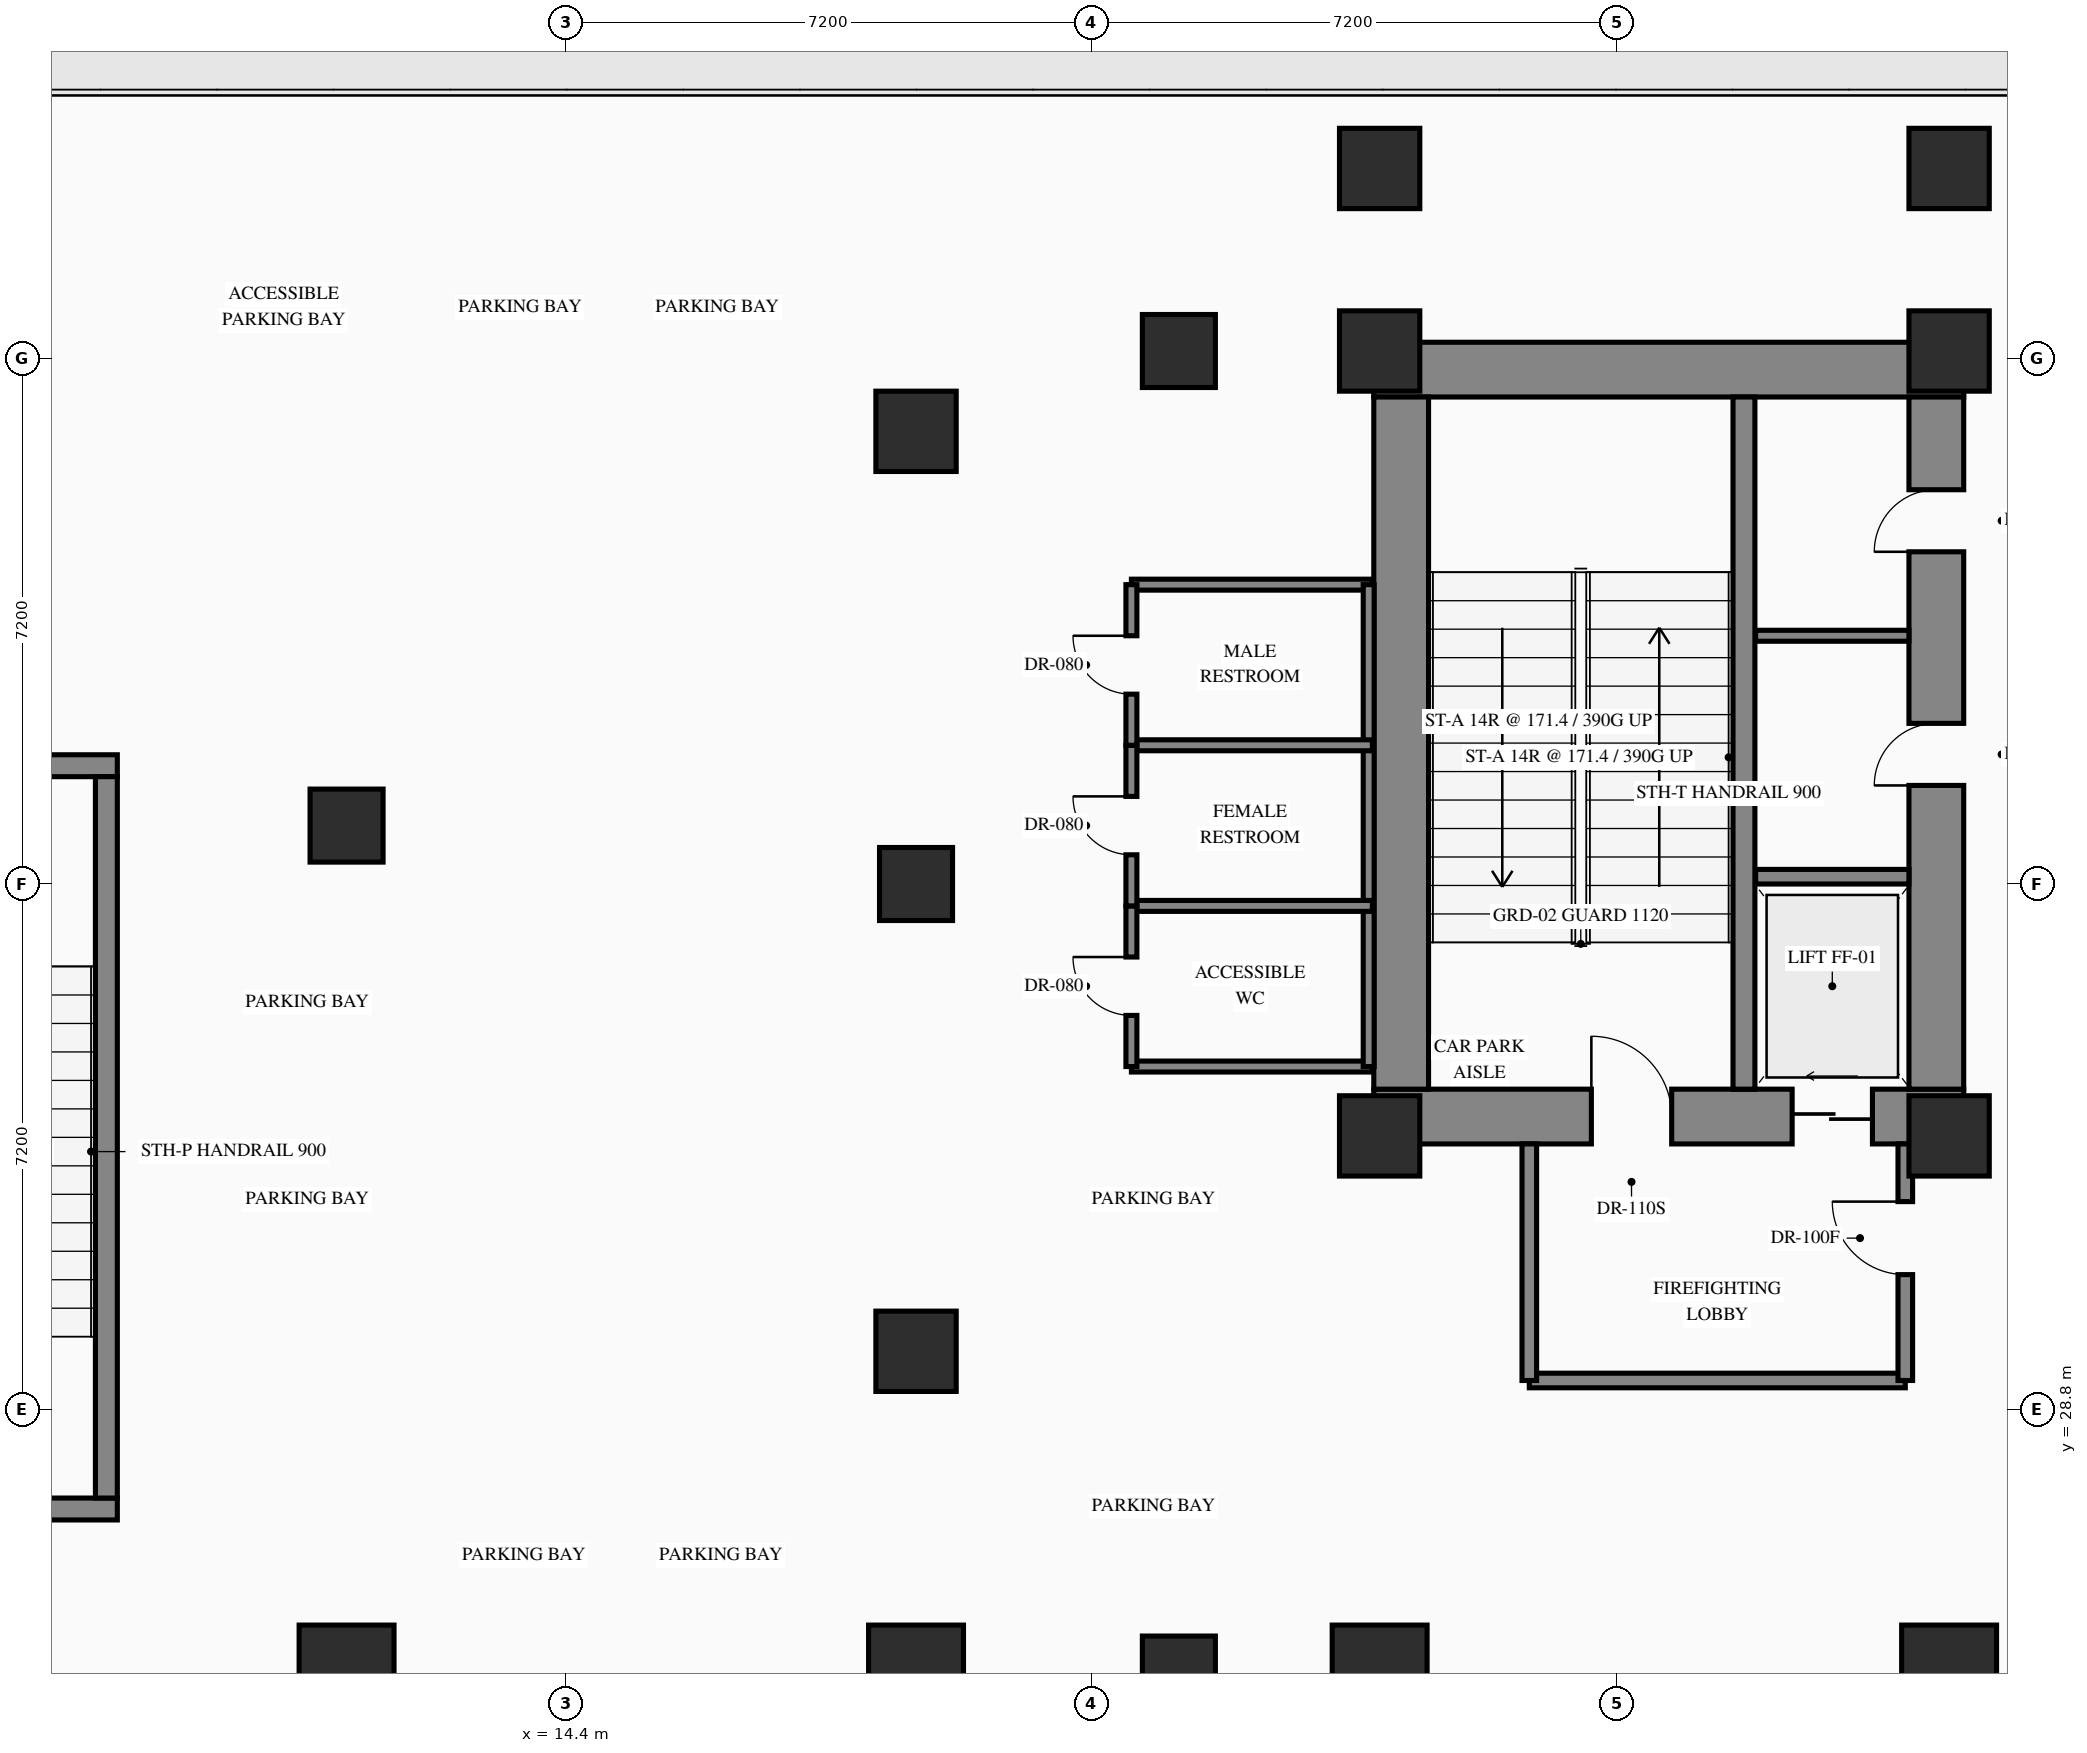
"""IFC4 building model, lengths in metres.
Left out: names, types, materials, properties, quantities, classifications, styles, units other than length and angle.
Written with IfcOpenShell. Run it as: python <this file> out.ifc"""

import sys

from ifc_helpers import new_model, si_unit, direction, frame, frame_2d, origin, origin_2d, place, context, subcontext, project, spatial, rectangle, hollow_rectangle, extrude, element, fill, save


model = new_model("IFC4")
c1 = context("Model", 3, precision=1e-05, world=origin(), true_north=direction((0.0, 1.0)))
c2 = subcontext(c1, "Body", "Model", "MODEL_VIEW")
j1 = project(units=[si_unit("LENGTHUNIT", "METRE"), si_unit("PLANEANGLEUNIT", "RADIAN")], contexts=[c1])
p1 = place(None, origin())
s1 = spatial("IfcSite", under=j1, at=p1, CompositionType="ELEMENT")
p2 = place(p1, origin())
s2 = spatial("IfcBuilding", under=s1, at=p2, CompositionType="ELEMENT")
p3 = place(p2, frame((0.0, 0.0, -9.6)))
s3 = spatial("IfcBuildingStorey", under=s2, at=p3, CompositionType="ELEMENT", Elevation=-9.6)
p4 = place(p3, frame((25.47, 32.815, 0.0), z_axis=(0.0, 0.0, 1.0), x_axis=(1.0, 0.0, 0.0)))
e1 = element("IfcWall", 1, at=p4, inside=s3, PredefinedType="SHEAR", context=c2, shape_type="SweptSolid", body=[
    extrude(rectangle(XDim=8.08, YDim=0.75, at=frame_2d((4.04, 0.0))), origin(), (0.0, 0.0, 1.0), 4.8),
])
p5 = place(p4, frame((2.98, 0.0, 0.0)))
e2 = element("IfcOpeningElement", 2, at=p5, cuts=e1, PredefinedType="OPENING", context=c2, shape_type="SweptSolid", body=[
    extrude(rectangle(XDim=1.1, YDim=2.2, at=frame_2d((0.55, 1.1))), frame((0.0, 0.385, 0.0), z_axis=(0.0, -1.0, 0.0), x_axis=(1.0, 0.0, 0.0)), (0.0, 0.0, 1.0), 0.77),
])
p6 = place(p4, frame((5.73, 0.0, 0.0)))
e3 = element("IfcOpeningElement", 3, at=p6, cuts=e1, PredefinedType="OPENING", context=c2, shape_type="SweptSolid", body=[
    extrude(rectangle(XDim=1.1, YDim=2.15, at=frame_2d((0.55, 1.075))), frame((0.0, 0.385, 0.0), z_axis=(0.0, -1.0, 0.0), x_axis=(1.0, 0.0, 0.0)), (0.0, 0.0, 1.0), 0.77),
])
p7 = place(p3, frame((25.47, 43.045, 0.0), z_axis=(0.0, 0.0, 1.0), x_axis=(1.0, 0.0, 0.0)))
e4 = element("IfcWall", 4, at=p7, inside=s3, PredefinedType="SHEAR", context=c2, shape_type="SweptSolid", body=[
    extrude(rectangle(XDim=8.08, YDim=0.75, at=frame_2d((4.04, 0.0))), origin(), (0.0, 0.0, 1.0), 4.8),
])
p8 = place(p3, frame((25.845, 33.19, 0.0), z_axis=(0.0, 0.0, 1.0), x_axis=(0.0, 1.0, 0.0)))
e5 = element("IfcWall", 5, at=p8, inside=s3, PredefinedType="SHEAR", context=c2, shape_type="SweptSolid", body=[
    extrude(rectangle(XDim=9.48, YDim=0.75, at=frame_2d((4.74, 0.0))), origin(), (0.0, 0.0, 1.0), 4.8),
])
p9 = place(p3, frame((33.175, 33.19, 0.0), z_axis=(0.0, 0.0, 1.0), x_axis=(0.0, 1.0, 0.0)))
e6 = element("IfcWall", 6, at=p9, inside=s3, PredefinedType="SHEAR", context=c2, shape_type="SweptSolid", body=[
    extrude(rectangle(XDim=9.48, YDim=0.75, at=frame_2d((4.74, 0.0))), origin(), (0.0, 0.0, 1.0), 4.8),
])
p10 = place(p9, frame((4.16, 0.0, 0.0)))
e7 = element("IfcOpeningElement", 7, at=p10, cuts=e6, PredefinedType="OPENING", context=c2, shape_type="SweptSolid", body=[
    extrude(rectangle(XDim=0.85, YDim=2.08, at=frame_2d((0.425, 1.04))), frame((0.0, 0.385, 0.0), z_axis=(0.0, -1.0, 0.0), x_axis=(1.0, 0.0, 0.0)), (0.0, 0.0, 1.0), 0.77),
])
p11 = place(p9, frame((7.36, 0.0, 0.0)))
e8 = element("IfcOpeningElement", 8, at=p11, cuts=e6, PredefinedType="OPENING", context=c2, shape_type="SweptSolid", body=[
    extrude(rectangle(XDim=0.85, YDim=2.08, at=frame_2d((0.425, 1.04))), frame((0.0, 0.385, 0.0), z_axis=(0.0, -1.0, 0.0), x_axis=(1.0, 0.0, 0.0)), (0.0, 0.0, 1.0), 0.77),
])
p12 = place(p3, frame((30.54, 33.19, 0.0), z_axis=(0.0, 0.0, 1.0), x_axis=(0.0, 1.0, 0.0)))
e9 = element("IfcWall", 9, at=p12, inside=s3, PredefinedType="SHEAR", context=c2, shape_type="SweptSolid", body=[
    extrude(rectangle(XDim=9.48, YDim=0.3, at=frame_2d((4.74, 0.0))), origin(), (0.0, 0.0, 1.0), 4.8),
])
p13 = place(p3, frame((3.09, 27.44, 0.0), z_axis=(0.0, 0.0, 1.0), x_axis=(1.0, 0.0, 0.0)))
e10 = element("IfcWall", 10, at=p13, inside=s3, PredefinedType="SHEAR", context=c2, shape_type="SweptSolid", body=[
    extrude(rectangle(XDim=5.17, YDim=0.3, at=frame_2d((2.585, 0.0))), origin(), (0.0, 0.0, 1.0), 4.8),
])
p14 = place(p13, frame((2.06, 0.0, 0.0)))
e11 = element("IfcOpeningElement", 11, at=p14, cuts=e10, PredefinedType="OPENING", context=c2, shape_type="SweptSolid", body=[
    extrude(rectangle(XDim=1.1, YDim=2.2, at=frame_2d((0.55, 1.1))), frame((0.0, 0.16, 0.0), z_axis=(0.0, -1.0, 0.0), x_axis=(1.0, 0.0, 0.0)), (0.0, 0.0, 1.0), 0.32),
])
p15 = place(p3, frame((3.09, 37.62, 0.0), z_axis=(0.0, 0.0, 1.0), x_axis=(1.0, 0.0, 0.0)))
e12 = element("IfcWall", 12, at=p15, inside=s3, PredefinedType="SHEAR", context=c2, shape_type="SweptSolid", body=[
    extrude(rectangle(XDim=5.17, YDim=0.3, at=frame_2d((2.585, 0.0))), origin(), (0.0, 0.0, 1.0), 4.8),
])
p16 = place(p3, frame((8.11, 27.59, 0.0), z_axis=(0.0, 0.0, 1.0), x_axis=(0.0, 1.0, 0.0)))
e13 = element("IfcWall", 13, at=p16, inside=s3, PredefinedType="SHEAR", context=c2, shape_type="SweptSolid", body=[
    extrude(rectangle(XDim=9.88, YDim=0.3, at=frame_2d((4.94, 0.0))), origin(), (0.0, 0.0, 1.0), 4.8),
])
for number, where, z_axis, x_axis in (
    (14, (25.55, 32.55, 0.0), (0.0, 0.0, 1.0), (1.0, 0.0, 0.0)),
    (15, (33.35, 32.55, 0.0), (0.0, 0.0, 1.0), (1.0, 0.0, 0.0)),
    (16, (25.55, 43.3, 0.0), (0.0, 0.0, 1.0), (1.0, 0.0, 0.0)),
    (17, (33.35, 43.3, 0.0), (0.0, 0.0, 1.0), (1.0, 0.0, 0.0)),
):
    element("IfcColumn", number, at=place(p3, frame(where, z_axis=z_axis, x_axis=x_axis)), inside=s3, PredefinedType="COLUMN", context=c2, shape_type="SweptSolid", body=[
        extrude(rectangle(XDim=1.1, YDim=1.1, at=origin_2d()), origin(), (0.0, 0.0, 1.0), 4.8),
    ])
for number, where, z_axis, x_axis in (
    (18, (25.55, 25.2, 0.0), (0.0, 0.0, 1.0), (1.0, 0.0, 0.0)),
    (19, (33.35, 25.2, 0.0), (0.0, 0.0, 1.0), (1.0, 0.0, 0.0)),
):
    element("IfcColumn", number, at=place(p3, frame(where, z_axis=z_axis, x_axis=x_axis)), inside=s3, PredefinedType="COLUMN", context=c2, shape_type="SweptSolid", body=[
        extrude(rectangle(XDim=1.3, YDim=1.3, at=origin_2d()), origin(), (0.0, 0.0, 1.0), 4.8),
    ])
for number, where, z_axis, x_axis in (
    (20, (25.55, 45.8, 0.0), (0.0, 0.0, 1.0), (1.0, 0.0, 0.0)),
    (21, (33.35, 45.8, 0.0), (0.0, 0.0, 1.0), (1.0, 0.0, 0.0)),
):
    element("IfcColumn", number, at=place(p3, frame(where, z_axis=z_axis, x_axis=x_axis)), inside=s3, PredefinedType="COLUMN", context=c2, shape_type="SweptSolid", body=[
        extrude(hollow_rectangle(XDim=1.1, YDim=1.1, WallThickness=0.04, at=origin_2d()), origin(), (0.0, 0.0, 1.0), 4.8),
    ])
for number, where, z_axis, x_axis in (
    (22, (11.4, 25.2, 0.0), (0.0, 0.0, 1.0), (1.0, 0.0, 0.0)),
    (23, (19.2, 25.2, 0.0), (0.0, 0.0, 1.0), (1.0, 0.0, 0.0)),
):
    element("IfcColumn", number, at=place(p3, frame(where, z_axis=z_axis, x_axis=x_axis)), inside=s3, PredefinedType="COLUMN", context=c2, shape_type="SweptSolid", body=[
        extrude(rectangle(XDim=1.3, YDim=1.3, at=origin_2d()), origin(), (0.0, 0.0, 1.0), 4.8),
    ])
for number, where, z_axis, x_axis in (
    (24, (19.2, 29.6, 0.0), (0.0, 0.0, 1.0), (1.0, 0.0, 0.0)),
    (25, (19.2, 42.2, 0.0), (0.0, 0.0, 1.0), (1.0, 0.0, 0.0)),
):
    element("IfcColumn", number, at=place(p3, frame(where, z_axis=z_axis, x_axis=x_axis)), inside=s3, PredefinedType="COLUMN", context=c2, shape_type="SweptSolid", body=[
        extrude(hollow_rectangle(XDim=1.1, YDim=1.1, WallThickness=0.04, at=origin_2d()), origin(), (0.0, 0.0, 1.0), 4.8),
    ])
for number, where, z_axis, x_axis in (
    (26, (22.8, 25.2, 0.0), (0.0, 0.0, 1.0), (1.0, 0.0, 0.0)),
    (27, (22.8, 43.3, 0.0), (0.0, 0.0, 1.0), (1.0, 0.0, 0.0)),
    (28, (11.4, 36.8, 0.0), (0.0, 0.0, 1.0), (1.0, 0.0, 0.0)),
    (29, (19.2, 36.0, 0.0), (0.0, 0.0, 1.0), (1.0, 0.0, 0.0)),
):
    element("IfcColumn", number, at=place(p3, frame(where, z_axis=z_axis, x_axis=x_axis)), inside=s3, PredefinedType="COLUMN", context=c2, shape_type="SweptSolid", body=[
        extrude(hollow_rectangle(XDim=1.0, YDim=1.0, WallThickness=0.038, at=origin_2d()), origin(), (0.0, 0.0, 1.0), 4.8),
    ])
p17 = place(p3, frame((30.7, 36.1, 0.0), z_axis=(0.0, 0.0, 1.0), x_axis=(1.0, 0.0, 0.0)))
e30 = element("IfcWall", 30, at=p17, inside=s3, PredefinedType="STANDARD", context=c2, shape_type="SweptSolid", body=[
    extrude(rectangle(XDim=2.1, YDim=0.2, at=frame_2d((1.05, 0.0))), origin(), (0.0, 0.0, 1.0), 4.5),
])
p18 = place(p3, frame((30.7, 39.4, 0.0), z_axis=(0.0, 0.0, 1.0), x_axis=(1.0, 0.0, 0.0)))
e31 = element("IfcWall", 31, at=p18, inside=s3, PredefinedType="PARTITIONING", context=c2, shape_type="SweptSolid", body=[
    extrude(rectangle(XDim=2.1, YDim=0.15, at=frame_2d((1.05, 0.0))), origin(), (0.0, 0.0, 1.0), 4.5),
])
p19 = place(p3, frame((27.6, 29.2, 0.0), z_axis=(0.0, 0.0, 1.0), x_axis=(1.0, 0.0, 0.0)))
e32 = element("IfcWall", 32, at=p19, inside=s3, PredefinedType="STANDARD", context=c2, shape_type="SweptSolid", body=[
    extrude(rectangle(XDim=5.15, YDim=0.2, at=frame_2d((2.575, 0.0))), origin(), (0.0, 0.0, 1.0), 4.5),
])
p20 = place(p3, frame((27.6, 29.2, 0.0), z_axis=(0.0, 0.0, 1.0), x_axis=(0.0, 1.0, 0.0)))
e33 = element("IfcWall", 33, at=p20, inside=s3, PredefinedType="STANDARD", context=c2, shape_type="SweptSolid", body=[
    extrude(rectangle(XDim=3.24, YDim=0.2, at=frame_2d((1.62, 0.0))), origin(), (0.0, 0.0, 1.0), 4.5),
])
p21 = place(p3, frame((32.75, 29.2, 0.0), z_axis=(0.0, 0.0, 1.0), x_axis=(0.0, 1.0, 0.0)))
e34 = element("IfcWall", 34, at=p21, inside=s3, PredefinedType="STANDARD", context=c2, shape_type="SweptSolid", body=[
    extrude(rectangle(XDim=3.24, YDim=0.2, at=frame_2d((1.62, 0.0))), origin(), (0.0, 0.0, 1.0), 4.5),
])
p22 = place(p21, frame((1.45, 0.0, 0.0)))
e35 = element("IfcOpeningElement", 35, at=p22, cuts=e34, PredefinedType="OPENING", context=c2, shape_type="SweptSolid", body=[
    extrude(rectangle(XDim=1.0, YDim=2.2, at=frame_2d((0.5, 1.1))), frame((0.0, 0.11, 0.0), z_axis=(0.0, -1.0, 0.0), x_axis=(1.0, 0.0, 0.0)), (0.0, 0.0, 1.0), 0.22),
])
for number, where, z_axis, x_axis in (
    (36, (22.15, 33.5, 0.0), (0.0, 0.0, 1.0), (1.0, 0.0, 0.0)),
    (37, (22.15, 40.1, 0.0), (0.0, 0.0, 1.0), (1.0, 0.0, 0.0)),
):
    element("IfcWall", number, at=place(p3, frame(where, z_axis=z_axis, x_axis=x_axis)), inside=s3, PredefinedType="PARTITIONING", context=c2, shape_type="SweptSolid", body=[
        extrude(rectangle(XDim=3.3, YDim=0.15, at=frame_2d((1.65, 0.0))), origin(), (0.0, 0.0, 1.0), 4.5),
    ])
p23 = place(p3, frame((25.4, 33.5, 0.0), z_axis=(0.0, 0.0, 1.0), x_axis=(0.0, 1.0, 0.0)))
e38 = element("IfcWall", 38, at=p23, inside=s3, PredefinedType="PARTITIONING", context=c2, shape_type="SweptSolid", body=[
    extrude(rectangle(XDim=6.6, YDim=0.15, at=frame_2d((3.3, 0.0))), origin(), (0.0, 0.0, 1.0), 4.5),
])
for number, where, z_axis, x_axis in (
    (39, (22.15, 35.7, 0.0), (0.0, 0.0, 1.0), (1.0, 0.0, 0.0)),
    (40, (22.15, 37.9, 0.0), (0.0, 0.0, 1.0), (1.0, 0.0, 0.0)),
):
    element("IfcWall", number, at=place(p3, frame(where, z_axis=z_axis, x_axis=x_axis)), inside=s3, PredefinedType="PARTITIONING", context=c2, shape_type="SweptSolid", body=[
        extrude(rectangle(XDim=3.3, YDim=0.15, at=frame_2d((1.65, 0.0))), origin(), (0.0, 0.0, 1.0), 4.5),
    ])
p24 = place(p3, frame((22.15, 33.5, 0.0), z_axis=(0.0, 0.0, 1.0), x_axis=(0.0, 1.0, 0.0)))
e41 = element("IfcWall", 41, at=p24, inside=s3, PredefinedType="PARTITIONING", context=c2, shape_type="SweptSolid", body=[
    extrude(rectangle(XDim=2.2, YDim=0.15, at=frame_2d((1.1, 0.0))), origin(), (0.0, 0.0, 1.0), 4.5),
])
p25 = place(p24, frame((0.7, 0.0, 0.0)))
e42 = element("IfcOpeningElement", 42, at=p25, cuts=e41, PredefinedType="OPENING", context=c2, shape_type="SweptSolid", body=[
    extrude(rectangle(XDim=0.8, YDim=2.06, at=frame_2d((0.4, 1.03))), frame((0.0, 0.085, 0.0), z_axis=(0.0, -1.0, 0.0), x_axis=(1.0, 0.0, 0.0)), (0.0, 0.0, 1.0), 0.17),
])
p26 = place(p3, frame((22.15, 35.7, 0.0), z_axis=(0.0, 0.0, 1.0), x_axis=(0.0, 1.0, 0.0)))
e43 = element("IfcWall", 43, at=p26, inside=s3, PredefinedType="PARTITIONING", context=c2, shape_type="SweptSolid", body=[
    extrude(rectangle(XDim=2.2, YDim=0.15, at=frame_2d((1.1, 0.0))), origin(), (0.0, 0.0, 1.0), 4.5),
])
p27 = place(p26, frame((0.7, 0.0, 0.0)))
e44 = element("IfcOpeningElement", 44, at=p27, cuts=e43, PredefinedType="OPENING", context=c2, shape_type="SweptSolid", body=[
    extrude(rectangle(XDim=0.8, YDim=2.06, at=frame_2d((0.4, 1.03))), frame((0.0, 0.085, 0.0), z_axis=(0.0, -1.0, 0.0), x_axis=(1.0, 0.0, 0.0)), (0.0, 0.0, 1.0), 0.17),
])
p28 = place(p3, frame((22.15, 37.9, 0.0), z_axis=(0.0, 0.0, 1.0), x_axis=(0.0, 1.0, 0.0)))
e45 = element("IfcWall", 45, at=p28, inside=s3, PredefinedType="PARTITIONING", context=c2, shape_type="SweptSolid", body=[
    extrude(rectangle(XDim=2.2, YDim=0.15, at=frame_2d((1.1, 0.0))), origin(), (0.0, 0.0, 1.0), 4.5),
])
p29 = place(p28, frame((0.7, 0.0, 0.0)))
e46 = element("IfcOpeningElement", 46, at=p29, cuts=e45, PredefinedType="OPENING", context=c2, shape_type="SweptSolid", body=[
    extrude(rectangle(XDim=0.8, YDim=2.06, at=frame_2d((0.4, 1.03))), frame((0.0, 0.085, 0.0), z_axis=(0.0, -1.0, 0.0), x_axis=(1.0, 0.0, 0.0)), (0.0, 0.0, 1.0), 0.17),
])
p30 = place(p5, origin())
e47 = element("IfcDoor", 47, at=p30, inside=s3, OperationType="SINGLE_SWING_LEFT", PredefinedType="DOOR", context=c2, shape_type="SweptSolid", body=[
    extrude(rectangle(XDim=1.1, YDim=2.2, at=frame_2d((0.55, 1.1))), frame((0.0, 0.025, 0.0), z_axis=(0.0, -1.0, 0.0), x_axis=(1.0, 0.0, 0.0)), (0.0, 0.0, 1.0), 0.05),
])
fill(e2, e47)
p31 = place(p6, origin())
e48 = element("IfcDoor", 48, at=p31, inside=s3, OperationType="SLIDING_TO_LEFT", PredefinedType="USERDEFINED", context=c2, shape_type="SweptSolid", body=[
    extrude(rectangle(XDim=1.1, YDim=2.15, at=frame_2d((0.55, 1.075))), frame((0.0, 0.025, 0.0), z_axis=(0.0, -1.0, 0.0), x_axis=(1.0, 0.0, 0.0)), (0.0, 0.0, 1.0), 0.05),
])
fill(e3, e48)
p32 = place(p10, origin())
e49 = element("IfcDoor", 49, at=p32, inside=s3, OperationType="SINGLE_SWING_LEFT", PredefinedType="DOOR", context=c2, shape_type="SweptSolid", body=[
    extrude(rectangle(XDim=0.85, YDim=2.08, at=frame_2d((0.425, 1.04))), frame((0.0, 0.025, 0.0), z_axis=(0.0, -1.0, 0.0), x_axis=(1.0, 0.0, 0.0)), (0.0, 0.0, 1.0), 0.05),
])
fill(e7, e49)
p33 = place(p11, origin())
e50 = element("IfcDoor", 50, at=p33, inside=s3, OperationType="SINGLE_SWING_LEFT", PredefinedType="DOOR", context=c2, shape_type="SweptSolid", body=[
    extrude(rectangle(XDim=0.85, YDim=2.08, at=frame_2d((0.425, 1.04))), frame((0.0, 0.025, 0.0), z_axis=(0.0, -1.0, 0.0), x_axis=(1.0, 0.0, 0.0)), (0.0, 0.0, 1.0), 0.05),
])
fill(e8, e50)
p34 = place(p22, origin())
e51 = element("IfcDoor", 51, at=p34, inside=s3, OperationType="SINGLE_SWING_RIGHT", PredefinedType="DOOR", context=c2, shape_type="SweptSolid", body=[
    extrude(rectangle(XDim=1.0, YDim=2.2, at=frame_2d((0.5, 1.1))), frame((0.0, 0.025, 0.0), z_axis=(0.0, -1.0, 0.0), x_axis=(1.0, 0.0, 0.0)), (0.0, 0.0, 1.0), 0.05),
])
fill(e35, e51)
p35 = place(p25, origin())
e52 = element("IfcDoor", 52, at=p35, inside=s3, OperationType="SINGLE_SWING_RIGHT", PredefinedType="DOOR", context=c2, shape_type="SweptSolid", body=[
    extrude(rectangle(XDim=0.8, YDim=2.06, at=frame_2d((0.4, 1.03))), frame((0.0, 0.025, 0.0), z_axis=(0.0, -1.0, 0.0), x_axis=(1.0, 0.0, 0.0)), (0.0, 0.0, 1.0), 0.05),
])
fill(e42, e52)
p36 = place(p27, origin())
e53 = element("IfcDoor", 53, at=p36, inside=s3, OperationType="SINGLE_SWING_RIGHT", PredefinedType="DOOR", context=c2, shape_type="SweptSolid", body=[
    extrude(rectangle(XDim=0.8, YDim=2.06, at=frame_2d((0.4, 1.03))), frame((0.0, 0.025, 0.0), z_axis=(0.0, -1.0, 0.0), x_axis=(1.0, 0.0, 0.0)), (0.0, 0.0, 1.0), 0.05),
])
fill(e44, e53)
p37 = place(p29, origin())
e54 = element("IfcDoor", 54, at=p37, inside=s3, OperationType="SINGLE_SWING_RIGHT", PredefinedType="DOOR", context=c2, shape_type="SweptSolid", body=[
    extrude(rectangle(XDim=0.8, YDim=2.06, at=frame_2d((0.4, 1.03))), frame((0.0, 0.025, 0.0), z_axis=(0.0, -1.0, 0.0), x_axis=(1.0, 0.0, 0.0)), (0.0, 0.0, 1.0), 0.05),
])
fill(e46, e54)
save(model, sys.argv[1])
